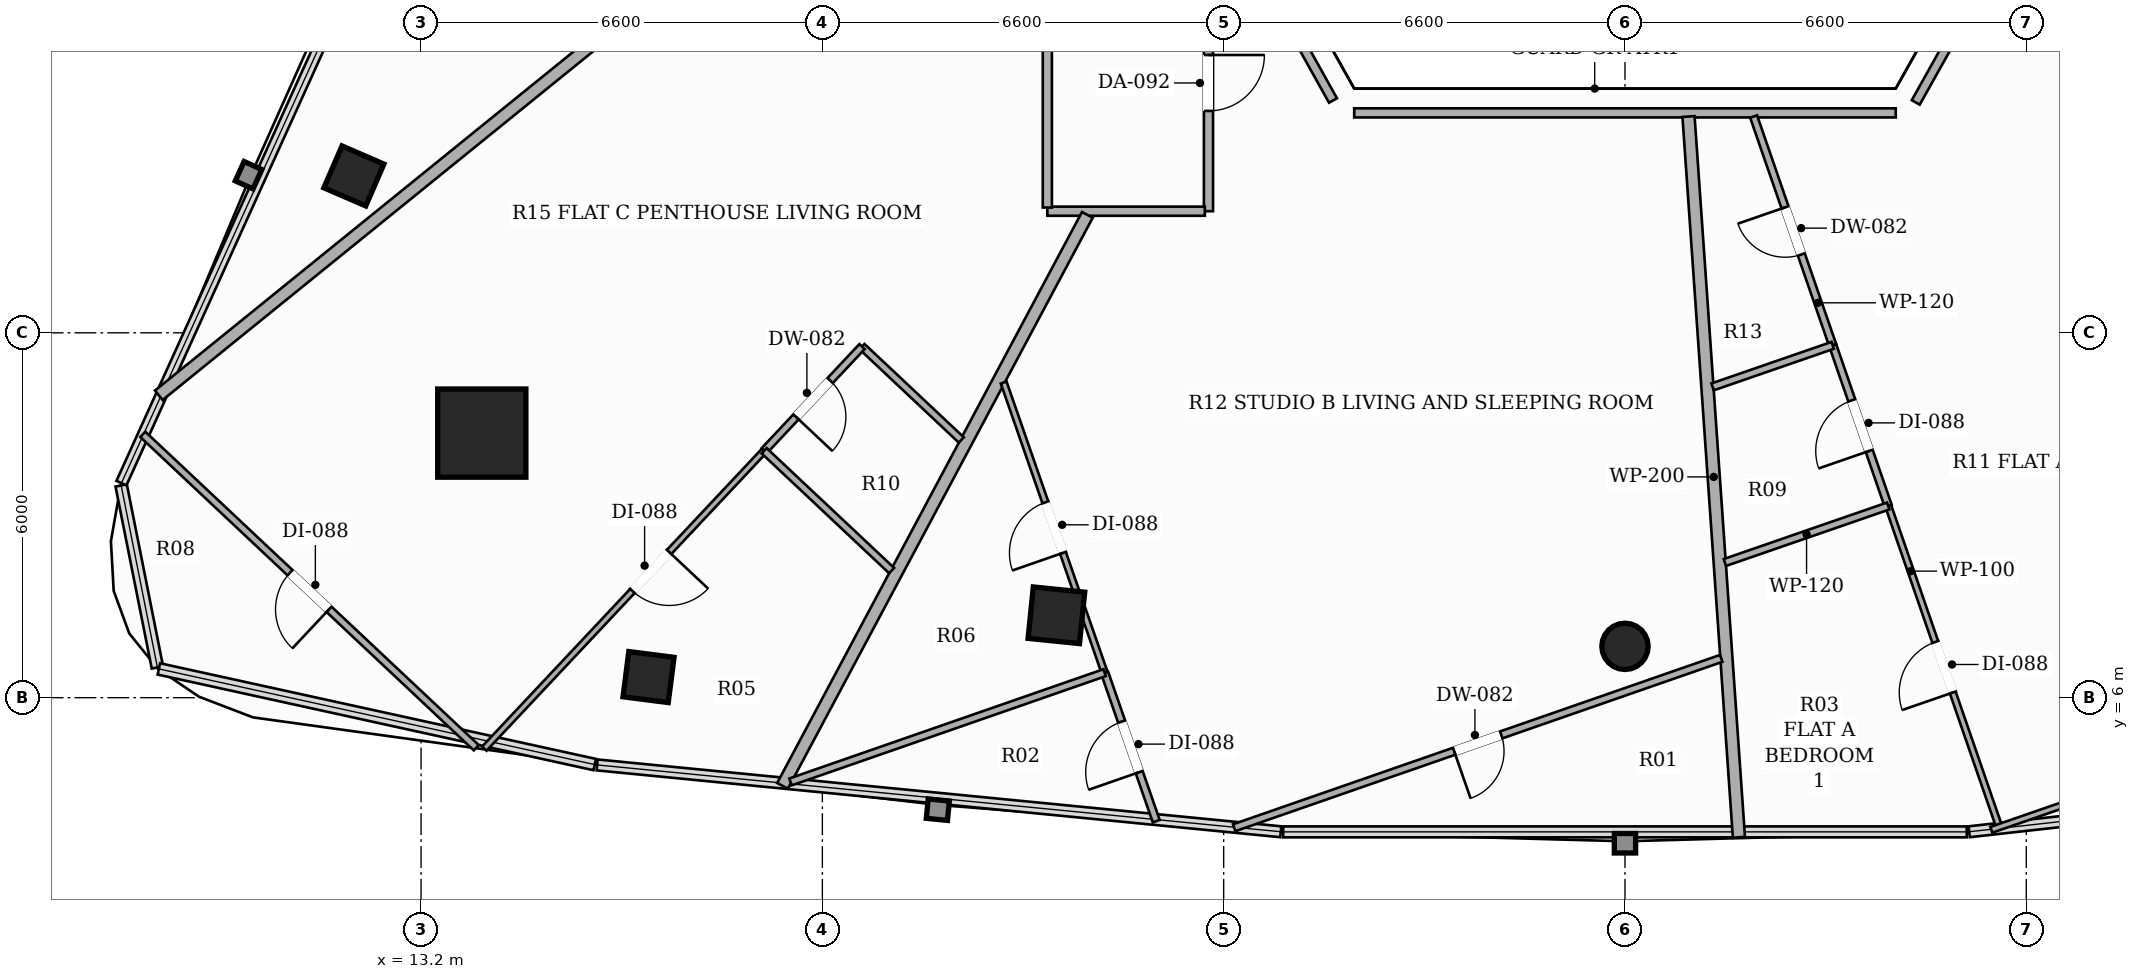
"""IFC4 building model, lengths in metres.
Left out: names, types, materials, properties, quantities, classifications, styles, units other than length and angle.
Written with IfcOpenShell. Run it as: python <this file> out.ifc"""

import sys

from ifc_helpers import new_model, si_unit, direction, frame, frame_2d, origin, origin_2d, place, context, subcontext, project, spatial, rectangle, hollow_rectangle, hollow_circle, extrude, element, fill, save


model = new_model("IFC4")
c1 = context("Model", 3, precision=1e-05, world=origin(), true_north=direction((0.0, 1.0)))
c2 = subcontext(c1, "Body", "Model", "MODEL_VIEW")
j1 = project(units=[si_unit("LENGTHUNIT", "METRE"), si_unit("PLANEANGLEUNIT", "RADIAN")], contexts=[c1])
p1 = place(None, origin())
s1 = spatial("IfcSite", under=j1, at=p1, CompositionType="ELEMENT")
p2 = place(p1, origin())
s2 = spatial("IfcBuilding", under=s1, at=p2, CompositionType="ELEMENT")
p3 = place(p2, frame((0.0, 0.0, 167.15)))
s3 = spatial("IfcBuildingStorey", under=s2, at=p3, CompositionType="ELEMENT", Elevation=167.15)
p4 = place(p3, frame((14.199, 10.351, 0.0), z_axis=(0.0, 0.0, 1.0), x_axis=(1.0, 0.0, 0.0)))
e1 = element("IfcColumn", 1, at=p4, inside=s3, PredefinedType="COLUMN", context=c2, shape_type="SweptSolid", body=[
    extrude(hollow_rectangle(XDim=1.45, YDim=1.45, WallThickness=0.045, at=origin_2d()), origin(), (0.0, 0.0, 1.0), 3.3),
])
p5 = place(p3, frame((23.649, 7.355, 0.0), z_axis=(0.0, 0.0, 1.0), x_axis=(-0.994880708829, 0.101056297183, 0.0)))
e2 = element("IfcColumn", 2, at=p5, inside=s3, PredefinedType="COLUMN", context=c2, shape_type="SweptSolid", body=[
    extrude(hollow_rectangle(XDim=0.85, YDim=0.85, WallThickness=0.028, at=origin_2d()), origin(), (0.0, 0.0, 1.0), 3.3),
])
p6 = place(p3, frame((33.0, 6.844, 0.0), z_axis=(0.0, 0.0, 1.0), x_axis=(1.0, 0.0, 0.0)))
e3 = element("IfcColumn", 3, at=p6, inside=s3, PredefinedType="COLUMN", context=c2, shape_type="SweptSolid", body=[
    extrude(hollow_circle(Radius=0.381, WallThickness=0.022, at=origin_2d()), origin(), (0.0, 0.0, 1.0), 3.3),
])
for number, where, z_axis, x_axis in (
    (4, (12.095, 14.58, 0.0), (0.0, 0.0, 1.0), (0.397, 0.918, 0.0)),
    (5, (16.941, 6.339, 0.0), (0.0, 0.0, 1.0), (-0.992, 0.127, 0.0)),
):
    element("IfcColumn", number, at=place(p3, frame(where, z_axis=z_axis, x_axis=x_axis)), inside=s3, PredefinedType="COLUMN", context=c2, shape_type="SweptSolid", body=[
        extrude(hollow_rectangle(XDim=0.75, YDim=0.75, WallThickness=0.025, at=origin_2d()), origin(), (0.0, 0.0, 1.0), 3.3),
    ])
p7 = place(p3, frame((26.15, 23.79, 0.0), z_axis=(0.0, 0.0, 1.0), x_axis=(0.0, -1.0, 0.0)))
e6 = element("IfcWall", 6, at=p7, inside=s3, PredefinedType="PARTITIONING", context=c2, shape_type="SweptSolid", body=[
    extrude(rectangle(XDim=9.79, YDim=0.15, at=frame_2d((4.895, 0.0))), origin(), (0.0, 0.0, 1.0), 2.721),
])
p8 = place(p7, frame((7.221, 0.0, 0.0)))
e7 = element("IfcOpeningElement", 7, at=p8, cuts=e6, PredefinedType="OPENING", context=c2, shape_type="SweptSolid", body=[
    extrude(rectangle(XDim=0.92, YDim=2.15, at=frame_2d((0.46, 1.075))), frame((0.0, 0.085, 0.0), z_axis=(0.0, -1.0, 0.0), x_axis=(1.0, 0.0, 0.0)), (0.0, 0.0, 1.0), 0.17),
])
p9 = place(p3, frame((26.09, 14.0, 0.0), z_axis=(0.0, 0.0, 1.0), x_axis=(-1.0, 0.0, 0.0)))
e8 = element("IfcWall", 8, at=p9, inside=s3, PredefinedType="PARTITIONING", context=c2, shape_type="SweptSolid", body=[
    extrude(rectangle(XDim=2.59, YDim=0.15, at=frame_2d((1.295, 0.0))), origin(), (0.0, 0.0, 1.0), 2.721),
])
p10 = place(p3, frame((23.5, 14.06, 0.0), z_axis=(0.0, 0.0, 1.0), x_axis=(0.0, 1.0, 0.0)))
e9 = element("IfcWall", 9, at=p10, inside=s3, PredefinedType="PARTITIONING", context=c2, shape_type="SweptSolid", body=[
    extrude(rectangle(XDim=22.84, YDim=0.15, at=frame_2d((11.42, 0.0))), origin(), (0.0, 0.0, 1.0), 2.413),
])
p11 = place(p10, frame((4.064, 0.0, 0.0)))
e10 = element("IfcOpeningElement", 10, at=p11, cuts=e9, PredefinedType="OPENING", context=c2, shape_type="SweptSolid", body=[
    extrude(rectangle(XDim=0.92, YDim=2.15, at=frame_2d((0.46, 1.075))), frame((0.0, 0.085, 0.0), z_axis=(0.0, -1.0, 0.0), x_axis=(1.0, 0.0, 0.0)), (0.0, 0.0, 1.0), 0.17),
])
p12 = place(p10, frame((13.047, 0.0, 0.0)))
e11 = element("IfcOpeningElement", 11, at=p12, cuts=e9, PredefinedType="OPENING", context=c2, shape_type="SweptSolid", body=[
    extrude(rectangle(XDim=0.88, YDim=2.1, at=frame_2d((0.44, 1.05))), frame((0.0, 0.085, 0.0), z_axis=(0.0, -1.0, 0.0), x_axis=(1.0, 0.0, 0.0)), (0.0, 0.0, 1.0), 0.17),
])
p13 = place(p10, frame((19.953, 0.0, 0.0)))
e12 = element("IfcOpeningElement", 12, at=p13, cuts=e9, PredefinedType="OPENING", context=c2, shape_type="SweptSolid", body=[
    extrude(rectangle(XDim=0.92, YDim=2.15, at=frame_2d((0.46, 1.075))), frame((0.0, 0.085, 0.0), z_axis=(0.0, -1.0, 0.0), x_axis=(1.0, 0.0, 0.0)), (0.0, 0.0, 1.0), 0.17),
])
p14 = place(p3, frame((38.276, 16.67, 0.0), z_axis=(0.0, 0.0, 1.0), x_axis=(-0.489067077696, -0.872246177127, 0.0)))
e13 = element("IfcWall", 13, at=p14, inside=s3, PredefinedType="PARTITIONING", context=c2, shape_type="SweptSolid", body=[
    extrude(rectangle(XDim=1.01, YDim=0.15, at=frame_2d((0.505, 0.0))), origin(), (0.0, 0.0, 1.0), 3.06),
])
p15 = place(p3, frame((37.453, 15.617, 0.0), z_axis=(0.0, 0.0, 1.0), x_axis=(-1.0, 0.0, 0.0)))
e14 = element("IfcWall", 14, at=p15, inside=s3, PredefinedType="PARTITIONING", context=c2, shape_type="SweptSolid", body=[
    extrude(rectangle(XDim=8.906, YDim=0.15, at=frame_2d((4.453, 0.0))), origin(), (0.0, 0.0, 1.0), 2.721),
])
p16 = place(p3, frame((28.198, 15.821, 0.0), z_axis=(0.0, 0.0, 1.0), x_axis=(-0.487432951818, 0.873160419099, 0.0)))
e15 = element("IfcWall", 15, at=p16, inside=s3, PredefinedType="PARTITIONING", context=c2, shape_type="SweptSolid", body=[
    extrude(rectangle(XDim=0.972, YDim=0.15, at=frame_2d((0.486, 0.0))), origin(), (0.0, 0.0, 1.0), 3.06),
])
p17 = place(p3, frame((34.874, 3.704, 0.0), z_axis=(0.0, 0.0, 1.0), x_axis=(-0.069779440561, 0.997562443998, 0.0)))
e16 = element("IfcWall", 16, at=p17, inside=s3, PredefinedType="PARTITIONING", context=c2, shape_type="SweptSolid", body=[
    extrude(rectangle(XDim=11.882, YDim=0.2, at=frame_2d((5.941, 0.0))), origin(), (0.0, 0.0, 1.0), 2.413),
])
p18 = place(p3, frame((37.295, 23.79, 0.0), z_axis=(0.0, 0.0, 1.0), x_axis=(0.539100523601, -0.842241429433, 0.0)))
e17 = element("IfcWall", 17, at=p18, inside=s3, PredefinedType="PARTITIONING", context=c2, shape_type="SweptSolid", body=[
    extrude(rectangle(XDim=22.488, YDim=0.2, at=frame_2d((11.244, 0.0))), origin(), (0.0, 0.0, 1.0), 2.413),
])
p19 = place(p3, frame((19.145, 4.55, 0.0), z_axis=(0.0, 0.0, 1.0), x_axis=(0.470953669838, 0.882157945533, 0.0)))
e18 = element("IfcWall", 18, at=p19, inside=s3, PredefinedType="PARTITIONING", context=c2, shape_type="SweptSolid", body=[
    extrude(rectangle(XDim=10.644, YDim=0.2, at=frame_2d((5.322, 0.0))), origin(), (0.0, 0.0, 1.0), 2.413),
])
p20 = place(p3, frame((8.887, 10.973, 0.0), z_axis=(0.0, 0.0, 1.0), x_axis=(0.777135864284, 0.629332859815, 0.0)))
e19 = element("IfcWall", 19, at=p20, inside=s3, PredefinedType="PARTITIONING", context=c2, shape_type="SweptSolid", body=[
    extrude(rectangle(XDim=18.726, YDim=0.2, at=frame_2d((9.363, 0.0))), origin(), (0.0, 0.0, 1.0), 2.413),
])
p21 = place(p3, frame((56.122, 5.904, 0.0), z_axis=(0.0, 0.0, 1.0), x_axis=(-0.684934612975, 0.728604540165, 0.0)))
e20 = element("IfcWall", 20, at=p21, inside=s3, PredefinedType="PARTITIONING", context=c2, shape_type="SweptSolid", body=[
    extrude(rectangle(XDim=24.548, YDim=0.2, at=frame_2d((12.274, 0.0))), origin(), (0.0, 0.0, 1.0), 2.413),
])
p22 = place(p3, frame((36.417, 11.794, 0.0), z_axis=(0.0, 0.0, 1.0), x_axis=(-0.326767254884, 0.945104841346, 0.0)))
e21 = element("IfcWall", 21, at=p22, inside=s3, PredefinedType="PARTITIONING", context=c2, shape_type="SweptSolid", body=[
    extrude(rectangle(XDim=3.981, YDim=0.12, at=frame_2d((1.991, 0.0))), origin(), (0.0, 0.0, 1.0), 3.06),
])
p23 = place(p22, frame((1.581, 0.0, 0.0)))
e22 = element("IfcOpeningElement", 22, at=p23, cuts=e21, PredefinedType="OPENING", context=c2, shape_type="SweptSolid", body=[
    extrude(rectangle(XDim=0.82, YDim=2.1, at=frame_2d((0.41, 1.05))), frame((0.0, 0.07, 0.0), z_axis=(0.0, -1.0, 0.0), x_axis=(1.0, 0.0, 0.0)), (0.0, 0.0, 1.0), 0.14),
])
p24 = place(p3, frame((37.33, 9.152, 0.0), z_axis=(0.0, 0.0, 1.0), x_axis=(-0.326663542442, 0.945140693251, 0.0)))
e23 = element("IfcWall", 23, at=p24, inside=s3, PredefinedType="PARTITIONING", context=c2, shape_type="SweptSolid", body=[
    extrude(rectangle(XDim=2.795, YDim=0.12, at=frame_2d((1.397, 0.0))), origin(), (0.0, 0.0, 1.0), 2.721),
])
p25 = place(p24, frame((0.958, 0.0, 0.0)))
e24 = element("IfcOpeningElement", 24, at=p25, cuts=e23, PredefinedType="OPENING", context=c2, shape_type="SweptSolid", body=[
    extrude(rectangle(XDim=0.88, YDim=2.1, at=frame_2d((0.44, 1.05))), frame((0.0, 0.07, 0.0), z_axis=(0.0, -1.0, 0.0), x_axis=(1.0, 0.0, 0.0)), (0.0, 0.0, 1.0), 0.14),
])
p26 = place(p3, frame((39.164, 3.848, 0.0), z_axis=(0.0, 0.0, 1.0), x_axis=(-0.326778856457, 0.945100830056, 0.0)))
e25 = element("IfcWall", 25, at=p26, inside=s3, PredefinedType="PARTITIONING", context=c2, shape_type="SweptSolid", body=[
    extrude(rectangle(XDim=5.612, YDim=0.1, at=frame_2d((2.806, 0.0))), origin(), (0.0, 0.0, 1.0), 2.413),
])
p27 = place(p26, frame((2.366, 0.0, 0.0)))
e26 = element("IfcOpeningElement", 26, at=p27, cuts=e25, PredefinedType="OPENING", context=c2, shape_type="SweptSolid", body=[
    extrude(rectangle(XDim=0.88, YDim=2.1, at=frame_2d((0.44, 1.05))), frame((0.0, 0.06, 0.0), z_axis=(0.0, -1.0, 0.0), x_axis=(1.0, 0.0, 0.0)), (0.0, 0.0, 1.0), 0.12),
])
p28 = place(p3, frame((47.988, 6.926, 0.0), z_axis=(0.0, 0.0, 1.0), x_axis=(-0.945100175753, -0.326780748809, 0.0)))
e27 = element("IfcWall", 27, at=p28, inside=s3, PredefinedType="PARTITIONING", context=c2, shape_type="SweptSolid", body=[
    extrude(rectangle(XDim=9.484, YDim=0.1, at=frame_2d((4.742, 0.0))), origin(), (0.0, 0.0, 1.0), 2.413),
])
p29 = place(p28, frame((4.302, 0.0, 0.0)))
e28 = element("IfcOpeningElement", 28, at=p29, cuts=e27, PredefinedType="OPENING", context=c2, shape_type="SweptSolid", body=[
    extrude(rectangle(XDim=0.88, YDim=2.1, at=frame_2d((0.44, 1.05))), frame((0.0, 0.06, 0.0), z_axis=(0.0, -1.0, 0.0), x_axis=(1.0, 0.0, 0.0)), (0.0, 0.0, 1.0), 0.12),
])
p30 = place(p3, frame((36.417, 11.794, 0.0), z_axis=(0.0, 0.0, 1.0), x_axis=(-0.945158093584, -0.326613193446, 0.0)))
e29 = element("IfcWall", 29, at=p30, inside=s3, PredefinedType="PARTITIONING", context=c2, shape_type="SweptSolid", body=[
    extrude(rectangle(XDim=2.091, YDim=0.12, at=frame_2d((1.045, 0.0))), origin(), (0.0, 0.0, 1.0), 3.06),
])
p31 = place(p3, frame((37.33, 9.152, 0.0), z_axis=(0.0, 0.0, 1.0), x_axis=(-0.945086078656, -0.326821516933, 0.0)))
e30 = element("IfcWall", 30, at=p31, inside=s3, PredefinedType="PARTITIONING", context=c2, shape_type="SweptSolid", body=[
    extrude(rectangle(XDim=2.843, YDim=0.12, at=frame_2d((1.422, 0.0))), origin(), (0.0, 0.0, 1.0), 2.721),
])
p32 = place(p3, frame((34.583, 6.646, 0.0), z_axis=(0.0, 0.0, 1.0), x_axis=(-0.944539899325, -0.328396678704, 0.0)))
e31 = element("IfcWall", 31, at=p32, inside=s3, PredefinedType="PARTITIONING", context=c2, shape_type="SweptSolid", body=[
    extrude(rectangle(XDim=8.48, YDim=0.12, at=frame_2d((4.24, 0.0))), origin(), (0.0, 0.0, 1.0), 2.413),
])
p33 = place(p32, frame((3.83, 0.0, 0.0)))
e32 = element("IfcOpeningElement", 32, at=p33, cuts=e31, PredefinedType="OPENING", context=c2, shape_type="SweptSolid", body=[
    extrude(rectangle(XDim=0.82, YDim=2.1, at=frame_2d((0.41, 1.05))), frame((0.0, 0.07, 0.0), z_axis=(0.0, -1.0, 0.0), x_axis=(1.0, 0.0, 0.0)), (0.0, 0.0, 1.0), 0.14),
])
p34 = place(p3, frame((25.291, 3.969, 0.0), z_axis=(0.0, 0.0, 1.0), x_axis=(-0.328440044658, 0.944524820778, 0.0)))
e33 = element("IfcWall", 33, at=p34, inside=s3, PredefinedType="PARTITIONING", context=c2, shape_type="SweptSolid", body=[
    extrude(rectangle(XDim=2.585, YDim=0.12, at=frame_2d((1.292, 0.0))), origin(), (0.0, 0.0, 1.0), 3.06),
])
p35 = place(p34, frame((0.853, 0.0, 0.0)))
e34 = element("IfcOpeningElement", 34, at=p35, cuts=e33, PredefinedType="OPENING", context=c2, shape_type="SweptSolid", body=[
    extrude(rectangle(XDim=0.88, YDim=2.1, at=frame_2d((0.44, 1.05))), frame((0.0, 0.07, 0.0), z_axis=(0.0, -1.0, 0.0), x_axis=(1.0, 0.0, 0.0)), (0.0, 0.0, 1.0), 0.14),
])
p36 = place(p3, frame((24.442, 6.411, 0.0), z_axis=(0.0, 0.0, 1.0), x_axis=(-0.328597479572, 0.944470061155, 0.0)))
e35 = element("IfcWall", 35, at=p36, inside=s3, PredefinedType="PARTITIONING", context=c2, shape_type="SweptSolid", body=[
    extrude(rectangle(XDim=5.052, YDim=0.1, at=frame_2d((2.526, 0.0))), origin(), (0.0, 0.0, 1.0), 2.413),
])
p37 = place(p36, frame((2.086, 0.0, 0.0)))
e36 = element("IfcOpeningElement", 36, at=p37, cuts=e35, PredefinedType="OPENING", context=c2, shape_type="SweptSolid", body=[
    extrude(rectangle(XDim=0.88, YDim=2.1, at=frame_2d((0.44, 1.05))), frame((0.0, 0.06, 0.0), z_axis=(0.0, -1.0, 0.0), x_axis=(1.0, 0.0, 0.0)), (0.0, 0.0, 1.0), 0.12),
])
p38 = place(p3, frame((19.276, 4.614, 0.0), z_axis=(0.0, 0.0, 1.0), x_axis=(0.944496796706, 0.328520624941, 0.0)))
e37 = element("IfcWall", 37, at=p38, inside=s3, PredefinedType="PARTITIONING", context=c2, shape_type="SweptSolid", body=[
    extrude(rectangle(XDim=5.469, YDim=0.12, at=frame_2d((2.735, 0.0))), origin(), (0.0, 0.0, 1.0), 2.619),
])
p39 = place(p3, frame((22.085, 10.238, 0.0), z_axis=(0.0, 0.0, 1.0), x_axis=(-0.728663547615, 0.684871837921, 0.0)))
e38 = element("IfcWall", 38, at=p39, inside=s3, PredefinedType="PARTITIONING", context=c2, shape_type="SweptSolid", body=[
    extrude(rectangle(XDim=2.241, YDim=0.12, at=frame_2d((1.121, 0.0))), origin(), (0.0, 0.0, 1.0), 2.721),
])
p40 = place(p3, frame((20.452, 11.773, 0.0), z_axis=(0.0, 0.0, 1.0), x_axis=(-0.684631978878, -0.728888917118, 0.0)))
e39 = element("IfcWall", 39, at=p40, inside=s3, PredefinedType="PARTITIONING", context=c2, shape_type="SweptSolid", body=[
    extrude(rectangle(XDim=2.35, YDim=0.12, at=frame_2d((1.175, 0.0))), origin(), (0.0, 0.0, 1.0), 2.721),
])
p41 = place(p40, frame((0.765, 0.0, 0.0)))
e40 = element("IfcOpeningElement", 40, at=p41, cuts=e39, PredefinedType="OPENING", context=c2, shape_type="SweptSolid", body=[
    extrude(rectangle(XDim=0.82, YDim=2.1, at=frame_2d((0.41, 1.05))), frame((0.0, 0.07, 0.0), z_axis=(0.0, -1.0, 0.0), x_axis=(1.0, 0.0, 0.0)), (0.0, 0.0, 1.0), 0.14),
])
p42 = place(p3, frame((14.108, 5.177, 0.0), z_axis=(0.0, 0.0, 1.0), x_axis=(-0.728745526687, 0.684784606525, 0.0)))
e41 = element("IfcWall", 41, at=p42, inside=s3, PredefinedType="PARTITIONING", context=c2, shape_type="SweptSolid", body=[
    extrude(rectangle(XDim=7.525, YDim=0.12, at=frame_2d((3.763, 0.0))), origin(), (0.0, 0.0, 1.0), 3.06),
])
p43 = place(p42, frame((3.323, 0.0, 0.0)))
e42 = element("IfcOpeningElement", 42, at=p43, cuts=e41, PredefinedType="OPENING", context=c2, shape_type="SweptSolid", body=[
    extrude(rectangle(XDim=0.88, YDim=2.1, at=frame_2d((0.44, 1.05))), frame((0.0, 0.07, 0.0), z_axis=(0.0, -1.0, 0.0), x_axis=(1.0, 0.0, 0.0)), (0.0, 0.0, 1.0), 0.14),
])
p44 = place(p3, frame((18.843, 10.06, 0.0), z_axis=(0.0, 0.0, 1.0), x_axis=(-0.6848274704, -0.728705246163, 0.0)))
e43 = element("IfcWall", 43, at=p44, inside=s3, PredefinedType="PARTITIONING", context=c2, shape_type="SweptSolid", body=[
    extrude(rectangle(XDim=6.721, YDim=0.1, at=frame_2d((3.361, 0.0))), origin(), (0.0, 0.0, 1.0), 2.413),
])
p45 = place(p44, frame((2.283, 0.0, 0.0)))
e44 = element("IfcOpeningElement", 44, at=p45, cuts=e43, PredefinedType="OPENING", context=c2, shape_type="SweptSolid", body=[
    extrude(rectangle(XDim=0.88, YDim=2.1, at=frame_2d((0.44, 1.05))), frame((0.0, 0.06, 0.0), z_axis=(0.0, -1.0, 0.0), x_axis=(1.0, 0.0, 0.0)), (0.0, 0.0, 1.0), 0.12),
])
p46 = place(p3, frame((20.939, 8.09, 0.0), z_axis=(0.0, 0.0, 1.0), x_axis=(-0.728665789254, 0.68486945294, 0.0)))
e45 = element("IfcWall", 45, at=p46, inside=s3, PredefinedType="PARTITIONING", context=c2, shape_type="SweptSolid", body=[
    extrude(rectangle(XDim=2.876, YDim=0.12, at=frame_2d((1.438, 0.0))), origin(), (0.0, 0.0, 1.0), 2.721),
])
p47 = place(p23, origin())
e46 = element("IfcDoor", 46, at=p47, inside=s3, OperationType="SINGLE_SWING_RIGHT", PredefinedType="DOOR", context=c2, shape_type="SweptSolid", body=[
    extrude(rectangle(XDim=0.82, YDim=2.1, at=frame_2d((0.41, 1.05))), frame((0.0, 0.025, 0.0), z_axis=(0.0, -1.0, 0.0), x_axis=(1.0, 0.0, 0.0)), (0.0, 0.0, 1.0), 0.05),
])
fill(e22, e46)
p48 = place(p25, origin())
e47 = element("IfcDoor", 47, at=p48, inside=s3, OperationType="SINGLE_SWING_LEFT", PredefinedType="DOOR", context=c2, shape_type="SweptSolid", body=[
    extrude(rectangle(XDim=0.88, YDim=2.1, at=frame_2d((0.44, 1.05))), frame((0.0, 0.025, 0.0), z_axis=(0.0, -1.0, 0.0), x_axis=(1.0, 0.0, 0.0)), (0.0, 0.0, 1.0), 0.05),
])
fill(e24, e47)
p49 = place(p27, origin())
e48 = element("IfcDoor", 48, at=p49, inside=s3, OperationType="SINGLE_SWING_LEFT", PredefinedType="DOOR", context=c2, shape_type="SweptSolid", body=[
    extrude(rectangle(XDim=0.88, YDim=2.1, at=frame_2d((0.44, 1.05))), frame((0.0, 0.025, 0.0), z_axis=(0.0, -1.0, 0.0), x_axis=(1.0, 0.0, 0.0)), (0.0, 0.0, 1.0), 0.05),
])
fill(e26, e48)
p50 = place(p8, origin())
e49 = element("IfcDoor", 49, at=p50, inside=s3, OperationType="SINGLE_SWING_LEFT", PredefinedType="DOOR", context=c2, shape_type="SweptSolid", body=[
    extrude(rectangle(XDim=0.92, YDim=2.15, at=frame_2d((0.46, 1.075))), frame((0.0, 0.025, 0.0), z_axis=(0.0, -1.0, 0.0), x_axis=(1.0, 0.0, 0.0)), (0.0, 0.0, 1.0), 0.05),
])
fill(e7, e49)
p51 = place(p33, origin())
e50 = element("IfcDoor", 50, at=p51, inside=s3, OperationType="SINGLE_SWING_RIGHT", PredefinedType="DOOR", context=c2, shape_type="SweptSolid", body=[
    extrude(rectangle(XDim=0.82, YDim=2.1, at=frame_2d((0.41, 1.05))), frame((0.0, 0.025, 0.0), z_axis=(0.0, -1.0, 0.0), x_axis=(1.0, 0.0, 0.0)), (0.0, 0.0, 1.0), 0.05),
])
fill(e32, e50)
p52 = place(p35, origin())
e51 = element("IfcDoor", 51, at=p52, inside=s3, OperationType="SINGLE_SWING_LEFT", PredefinedType="DOOR", context=c2, shape_type="SweptSolid", body=[
    extrude(rectangle(XDim=0.88, YDim=2.1, at=frame_2d((0.44, 1.05))), frame((0.0, 0.025, 0.0), z_axis=(0.0, -1.0, 0.0), x_axis=(1.0, 0.0, 0.0)), (0.0, 0.0, 1.0), 0.05),
])
fill(e34, e51)
p53 = place(p37, origin())
e52 = element("IfcDoor", 52, at=p53, inside=s3, OperationType="SINGLE_SWING_LEFT", PredefinedType="DOOR", context=c2, shape_type="SweptSolid", body=[
    extrude(rectangle(XDim=0.88, YDim=2.1, at=frame_2d((0.44, 1.05))), frame((0.0, 0.025, 0.0), z_axis=(0.0, -1.0, 0.0), x_axis=(1.0, 0.0, 0.0)), (0.0, 0.0, 1.0), 0.05),
])
fill(e36, e52)
p54 = place(p41, origin())
e53 = element("IfcDoor", 53, at=p54, inside=s3, OperationType="SINGLE_SWING_RIGHT", PredefinedType="DOOR", context=c2, shape_type="SweptSolid", body=[
    extrude(rectangle(XDim=0.82, YDim=2.1, at=frame_2d((0.41, 1.05))), frame((0.0, 0.025, 0.0), z_axis=(0.0, -1.0, 0.0), x_axis=(1.0, 0.0, 0.0)), (0.0, 0.0, 1.0), 0.05),
])
fill(e40, e53)
p55 = place(p43, origin())
e54 = element("IfcDoor", 54, at=p55, inside=s3, OperationType="SINGLE_SWING_LEFT", PredefinedType="DOOR", context=c2, shape_type="SweptSolid", body=[
    extrude(rectangle(XDim=0.88, YDim=2.1, at=frame_2d((0.44, 1.05))), frame((0.0, 0.025, 0.0), z_axis=(0.0, -1.0, 0.0), x_axis=(1.0, 0.0, 0.0)), (0.0, 0.0, 1.0), 0.05),
])
fill(e42, e54)
p56 = place(p45, origin())
e55 = element("IfcDoor", 55, at=p56, inside=s3, OperationType="SINGLE_SWING_LEFT", PredefinedType="DOOR", context=c2, shape_type="SweptSolid", body=[
    extrude(rectangle(XDim=0.88, YDim=2.1, at=frame_2d((0.44, 1.05))), frame((0.0, 0.025, 0.0), z_axis=(0.0, -1.0, 0.0), x_axis=(1.0, 0.0, 0.0)), (0.0, 0.0, 1.0), 0.05),
])
fill(e44, e55)
save(model, sys.argv[1])
